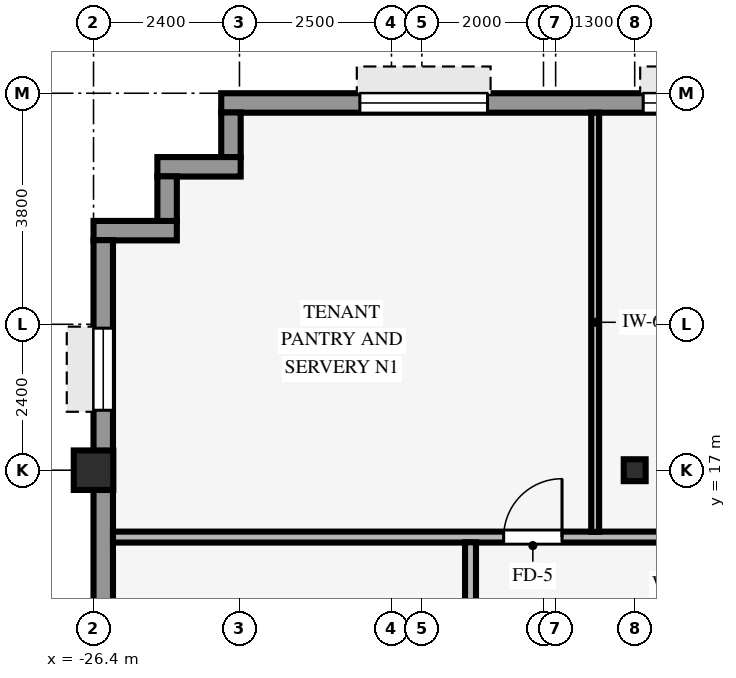
"""IFC4 building model, lengths in metres.
Left out: names, types, materials, properties, quantities, classifications, styles, units other than length and angle.
Written with IfcOpenShell. Run it as: python <this file> out.ifc"""

import sys

from ifc_helpers import new_model, si_unit, direction, frame, frame_2d, origin, origin_2d, place, context, subcontext, project, spatial, rectangle, hollow_rectangle, i_section, extrude, source, transform, mapped, element, fill, save


model = new_model("IFC4")
c1 = context("Model", 3, precision=1e-05, world=origin(), true_north=direction((0.0, 1.0)))
c2 = subcontext(c1, "Body", "Model", "MODEL_VIEW")
j1 = project(units=[si_unit("LENGTHUNIT", "METRE"), si_unit("PLANEANGLEUNIT", "RADIAN")], contexts=[c1])
p1 = place(None, origin())
s1 = spatial("IfcSite", under=j1, at=p1, CompositionType="ELEMENT")
p2 = place(p1, origin())
s2 = spatial("IfcBuilding", under=s1, at=p2, CompositionType="ELEMENT")
p3 = place(p2, frame((0.0, 0.0, 164.0)))
s3 = spatial("IfcBuildingStorey", under=s2, at=p3, CompositionType="ELEMENT", Elevation=164.0)
p4 = place(p3, frame((-26.4, 17.0, 0.0), z_axis=(0.0, 0.0, 1.0), x_axis=(1.0, 0.0, 0.0)))
e1 = element("IfcColumn", 1, at=p4, inside=s3, PredefinedType="COLUMN", context=c2, shape_type="SweptSolid", body=[
    extrude(hollow_rectangle(XDim=0.65, YDim=0.65, WallThickness=0.04, InnerFilletRadius=0.04, OuterFilletRadius=0.08, at=origin_2d()), origin(), (0.0, 0.0, 1.0), 3.25),
])
p5 = place(p3, frame((-17.5, 17.0, 0.0), z_axis=(0.0, 0.0, 1.0), x_axis=(1.0, 0.0, 0.0)))
e2 = element("IfcColumn", 2, at=p5, inside=s3, PredefinedType="COLUMN", context=c2, shape_type="SweptSolid", body=[
    extrude(i_section(OverallWidth=0.36, OverallDepth=0.36, WebThickness=0.021, FlangeThickness=0.021, FilletRadius=0.018, at=origin_2d()), origin(), (0.0, 0.0, 1.0), 3.25),
])
p6 = place(p3, frame((-24.3, 23.04, 0.0), z_axis=(0.0, 0.0, 1.0), x_axis=(1.0, 0.0, 0.0)))
e3 = element("IfcWall", 3, at=p6, inside=s3, PredefinedType="STANDARD", context=c2, shape_type="SweptSolid", body=[
    extrude(rectangle(XDim=48.6, YDim=0.32, at=frame_2d((24.3, 0.0))), origin(), (0.0, 0.0, 1.0), 2.792),
])
p7 = place(p6, frame((28.5, 0.0, 0.0)))
e4 = element("IfcOpeningElement", 4, at=p7, cuts=e3, PredefinedType="OPENING", context=c2, shape_type="SweptSolid", body=[
    extrude(rectangle(XDim=1.05, YDim=2.1, at=frame_2d((0.525, 1.05))), frame((0.0, 0.17, 0.0), z_axis=(0.0, -1.0, 0.0), x_axis=(1.0, 0.0, 0.0)), (0.0, 0.0, 1.0), 0.34),
])
p8 = place(p6, frame((2.28, 0.0, 0.8)))
e5 = element("IfcOpeningElement", 5, at=p8, cuts=e3, PredefinedType="OPENING", context=c2, shape_type="SweptSolid", body=[
    extrude(rectangle(XDim=2.1, YDim=1.56, at=frame_2d((1.05, 0.78))), frame((0.0, 0.17, 0.0), z_axis=(0.0, -1.0, 0.0), x_axis=(1.0, 0.0, 0.0)), (0.0, 0.0, 1.0), 0.34),
])
p9 = place(p6, frame((6.94, 0.0, 0.8)))
e6 = element("IfcOpeningElement", 6, at=p9, cuts=e3, PredefinedType="OPENING", context=c2, shape_type="SweptSolid", body=[
    extrude(rectangle(XDim=2.1, YDim=1.56, at=frame_2d((1.05, 0.78))), frame((0.0, 0.17, 0.0), z_axis=(0.0, -1.0, 0.0), x_axis=(1.0, 0.0, 0.0)), (0.0, 0.0, 1.0), 0.34),
])
p10 = place(p6, frame((11.6, 0.0, 0.8)))
e7 = element("IfcOpeningElement", 7, at=p10, cuts=e3, PredefinedType="OPENING", context=c2, shape_type="SweptSolid", body=[
    extrude(rectangle(XDim=2.1, YDim=1.56, at=frame_2d((1.05, 0.78))), frame((0.0, 0.17, 0.0), z_axis=(0.0, -1.0, 0.0), x_axis=(1.0, 0.0, 0.0)), (0.0, 0.0, 1.0), 0.34),
])
p11 = place(p6, frame((17.61, 0.0, 0.8)))
e8 = element("IfcOpeningElement", 8, at=p11, cuts=e3, PredefinedType="OPENING", context=c2, shape_type="SweptSolid", body=[
    extrude(rectangle(XDim=2.1, YDim=1.56, at=frame_2d((1.05, 0.78))), frame((0.0, 0.17, 0.0), z_axis=(0.0, -1.0, 0.0), x_axis=(1.0, 0.0, 0.0)), (0.0, 0.0, 1.0), 0.34),
])
p12 = place(p6, frame((20.92, 0.0, 0.8)))
e9 = element("IfcOpeningElement", 9, at=p12, cuts=e3, PredefinedType="OPENING", context=c2, shape_type="SweptSolid", body=[
    extrude(rectangle(XDim=2.1, YDim=1.56, at=frame_2d((1.05, 0.78))), frame((0.0, 0.17, 0.0), z_axis=(0.0, -1.0, 0.0), x_axis=(1.0, 0.0, 0.0)), (0.0, 0.0, 1.0), 0.34),
])
p13 = place(p6, frame((25.58, 0.0, 0.8)))
e10 = element("IfcOpeningElement", 10, at=p13, cuts=e3, PredefinedType="OPENING", context=c2, shape_type="SweptSolid", body=[
    extrude(rectangle(XDim=2.1, YDim=1.56, at=frame_2d((1.05, 0.78))), frame((0.0, 0.17, 0.0), z_axis=(0.0, -1.0, 0.0), x_axis=(1.0, 0.0, 0.0)), (0.0, 0.0, 1.0), 0.34),
])
p14 = place(p6, frame((34.9, 0.0, 0.8)))
e11 = element("IfcOpeningElement", 11, at=p14, cuts=e3, PredefinedType="OPENING", context=c2, shape_type="SweptSolid", body=[
    extrude(rectangle(XDim=2.1, YDim=1.56, at=frame_2d((1.05, 0.78))), frame((0.0, 0.17, 0.0), z_axis=(0.0, -1.0, 0.0), x_axis=(1.0, 0.0, 0.0)), (0.0, 0.0, 1.0), 0.34),
])
p15 = place(p6, frame((39.56, 0.0, 0.8)))
e12 = element("IfcOpeningElement", 12, at=p15, cuts=e3, PredefinedType="OPENING", context=c2, shape_type="SweptSolid", body=[
    extrude(rectangle(XDim=2.1, YDim=1.56, at=frame_2d((1.05, 0.78))), frame((0.0, 0.17, 0.0), z_axis=(0.0, -1.0, 0.0), x_axis=(1.0, 0.0, 0.0)), (0.0, 0.0, 1.0), 0.34),
])
p16 = place(p6, frame((44.22, 0.0, 0.8)))
e13 = element("IfcOpeningElement", 13, at=p16, cuts=e3, PredefinedType="OPENING", context=c2, shape_type="SweptSolid", body=[
    extrude(rectangle(XDim=2.1, YDim=1.56, at=frame_2d((1.05, 0.78))), frame((0.0, 0.17, 0.0), z_axis=(0.0, -1.0, 0.0), x_axis=(1.0, 0.0, 0.0)), (0.0, 0.0, 1.0), 0.34),
])
p17 = place(p3, frame((-24.14, 22.146, 0.0), z_axis=(0.0, 0.0, 1.0), x_axis=(0.0, 1.0, 0.0)))
e14 = element("IfcWall", 14, at=p17, inside=s3, PredefinedType="STANDARD", context=c2, shape_type="SweptSolid", body=[
    extrude(rectangle(XDim=0.738, YDim=0.32, at=frame_2d((0.369, 0.0))), origin(), (0.0, 0.0, 1.0), 3.24),
])
p18 = place(p3, frame((-25.35, 21.99, 0.0), z_axis=(0.0, 0.0, 1.0), x_axis=(1.0, 0.0, 0.0)))
e15 = element("IfcWall", 15, at=p18, inside=s3, PredefinedType="STANDARD", context=c2, shape_type="SweptSolid", body=[
    extrude(rectangle(XDim=1.37, YDim=0.32, at=frame_2d((0.685, 0.0))), origin(), (0.0, 0.0, 1.0), 3.24),
])
p19 = place(p3, frame((-25.19, 21.096, 0.0), z_axis=(0.0, 0.0, 1.0), x_axis=(0.0, 1.0, 0.0)))
e16 = element("IfcWall", 16, at=p19, inside=s3, PredefinedType="STANDARD", context=c2, shape_type="SweptSolid", body=[
    extrude(rectangle(XDim=0.738, YDim=0.32, at=frame_2d((0.369, 0.0))), origin(), (0.0, 0.0, 1.0), 3.24),
])
p20 = place(p3, frame((-26.4, 20.94, 0.0), z_axis=(0.0, 0.0, 1.0), x_axis=(1.0, 0.0, 0.0)))
e17 = element("IfcWall", 17, at=p20, inside=s3, PredefinedType="STANDARD", context=c2, shape_type="SweptSolid", body=[
    extrude(rectangle(XDim=1.37, YDim=0.32, at=frame_2d((0.685, 0.0))), origin(), (0.0, 0.0, 1.0), 3.24),
])
p21 = place(p3, frame((-26.24, -20.784, 0.0), z_axis=(0.0, 0.0, 1.0), x_axis=(0.0, 1.0, 0.0)))
e18 = element("IfcWall", 18, at=p21, inside=s3, PredefinedType="STANDARD", context=c2, shape_type="SweptSolid", body=[
    extrude(rectangle(XDim=41.568, YDim=0.32, at=frame_2d((20.784, 0.0))), origin(), (0.0, 0.0, 1.0), 2.585),
])
p22 = place(p21, frame((1.448, 0.0, 0.8)))
e19 = element("IfcOpeningElement", 19, at=p22, cuts=e18, PredefinedType="OPENING", context=c2, shape_type="SweptSolid", body=[
    extrude(rectangle(XDim=1.35, YDim=1.56, at=frame_2d((0.675, 0.78))), frame((0.0, 0.17, 0.0), z_axis=(0.0, -1.0, 0.0), x_axis=(1.0, 0.0, 0.0)), (0.0, 0.0, 1.0), 0.34),
])
p23 = place(p21, frame((7.744, 0.0, 0.8)))
e20 = element("IfcOpeningElement", 20, at=p23, cuts=e18, PredefinedType="OPENING", context=c2, shape_type="SweptSolid", body=[
    extrude(rectangle(XDim=1.35, YDim=1.56, at=frame_2d((0.675, 0.78))), frame((0.0, 0.17, 0.0), z_axis=(0.0, -1.0, 0.0), x_axis=(1.0, 0.0, 0.0)), (0.0, 0.0, 1.0), 0.34),
])
p24 = place(p21, frame((13.14, 0.0, 0.8)))
e21 = element("IfcOpeningElement", 21, at=p24, cuts=e18, PredefinedType="OPENING", context=c2, shape_type="SweptSolid", body=[
    extrude(rectangle(XDim=1.35, YDim=1.56, at=frame_2d((0.675, 0.78))), frame((0.0, 0.17, 0.0), z_axis=(0.0, -1.0, 0.0), x_axis=(1.0, 0.0, 0.0)), (0.0, 0.0, 1.0), 0.34),
])
p25 = place(p21, frame((17.636, 0.0, 0.8)))
e22 = element("IfcOpeningElement", 22, at=p25, cuts=e18, PredefinedType="OPENING", context=c2, shape_type="SweptSolid", body=[
    extrude(rectangle(XDim=1.35, YDim=1.56, at=frame_2d((0.675, 0.78))), frame((0.0, 0.17, 0.0), z_axis=(0.0, -1.0, 0.0), x_axis=(1.0, 0.0, 0.0)), (0.0, 0.0, 1.0), 0.34),
])
p26 = place(p21, frame((22.582, 0.0, 0.8)))
e23 = element("IfcOpeningElement", 23, at=p26, cuts=e18, PredefinedType="OPENING", context=c2, shape_type="SweptSolid", body=[
    extrude(rectangle(XDim=1.35, YDim=1.56, at=frame_2d((0.675, 0.78))), frame((0.0, 0.17, 0.0), z_axis=(0.0, -1.0, 0.0), x_axis=(1.0, 0.0, 0.0)), (0.0, 0.0, 1.0), 0.34),
])
p27 = place(p21, frame((27.078, 0.0, 0.8)))
e24 = element("IfcOpeningElement", 24, at=p27, cuts=e18, PredefinedType="OPENING", context=c2, shape_type="SweptSolid", body=[
    extrude(rectangle(XDim=1.35, YDim=1.56, at=frame_2d((0.675, 0.78))), frame((0.0, 0.17, 0.0), z_axis=(0.0, -1.0, 0.0), x_axis=(1.0, 0.0, 0.0)), (0.0, 0.0, 1.0), 0.34),
])
p28 = place(p21, frame((32.474, 0.0, 0.8)))
e25 = element("IfcOpeningElement", 25, at=p28, cuts=e18, PredefinedType="OPENING", context=c2, shape_type="SweptSolid", body=[
    extrude(rectangle(XDim=1.35, YDim=1.56, at=frame_2d((0.675, 0.78))), frame((0.0, 0.17, 0.0), z_axis=(0.0, -1.0, 0.0), x_axis=(1.0, 0.0, 0.0)), (0.0, 0.0, 1.0), 0.34),
])
p29 = place(p21, frame((38.77, 0.0, 0.8)))
e26 = element("IfcOpeningElement", 26, at=p29, cuts=e18, PredefinedType="OPENING", context=c2, shape_type="SweptSolid", body=[
    extrude(rectangle(XDim=1.35, YDim=1.56, at=frame_2d((0.675, 0.78))), frame((0.0, 0.17, 0.0), z_axis=(0.0, -1.0, 0.0), x_axis=(1.0, 0.0, 0.0)), (0.0, 0.0, 1.0), 0.34),
])
p30 = place(p3, frame((-26.08, 15.9, 0.0), z_axis=(0.0, 0.0, 1.0), x_axis=(1.0, 0.0, 0.0)))
e27 = element("IfcWall", 27, at=p30, inside=s3, PredefinedType="PARTITIONING", context=c2, shape_type="SweptSolid", body=[
    extrude(rectangle(XDim=52.16, YDim=0.18, at=frame_2d((26.08, 0.0))), origin(), (0.0, 0.0, 1.0), 3.24),
])
p31 = place(p30, frame((24.5, 0.0, 0.0)))
e28 = element("IfcOpeningElement", 28, at=p31, cuts=e27, PredefinedType="OPENING", context=c2, shape_type="SweptSolid", body=[
    extrude(rectangle(XDim=0.96, YDim=2.1, at=frame_2d((0.48, 1.05))), frame((0.0, 0.1, 0.0), z_axis=(0.0, -1.0, 0.0), x_axis=(1.0, 0.0, 0.0)), (0.0, 0.0, 1.0), 0.2),
])
p32 = place(p30, frame((40.5, 0.0, 0.0)))
e29 = element("IfcOpeningElement", 29, at=p32, cuts=e27, PredefinedType="OPENING", context=c2, shape_type="SweptSolid", body=[
    extrude(rectangle(XDim=0.96, YDim=2.1, at=frame_2d((0.48, 1.05))), frame((0.0, 0.1, 0.0), z_axis=(0.0, -1.0, 0.0), x_axis=(1.0, 0.0, 0.0)), (0.0, 0.0, 1.0), 0.2),
])
p33 = place(p30, frame((13.16, 0.0, 0.0)))
e30 = element("IfcOpeningElement", 30, at=p33, cuts=e27, PredefinedType="OPENING", context=c2, shape_type="SweptSolid", body=[
    extrude(rectangle(XDim=0.96, YDim=2.1, at=frame_2d((0.48, 1.05))), frame((0.0, 0.1, 0.0), z_axis=(0.0, -1.0, 0.0), x_axis=(1.0, 0.0, 0.0)), (0.0, 0.0, 1.0), 0.2),
])
p34 = place(p30, frame((6.425, 0.0, 0.0)))
e31 = element("IfcOpeningElement", 31, at=p34, cuts=e27, PredefinedType="OPENING", context=c2, shape_type="SweptSolid", body=[
    extrude(rectangle(XDim=0.96, YDim=2.1, at=frame_2d((0.48, 1.05))), frame((0.0, 0.1, 0.0), z_axis=(0.0, -1.0, 0.0), x_axis=(1.0, 0.0, 0.0)), (0.0, 0.0, 1.0), 0.2),
])
p35 = place(p3, frame((-20.2, -15.814, 0.0), z_axis=(0.0, 0.0, 1.0), x_axis=(0.0, 1.0, 0.0)))
e32 = element("IfcWall", 32, at=p35, inside=s3, PredefinedType="PARTITIONING", context=c2, shape_type="SweptSolid", body=[
    extrude(rectangle(XDim=31.628, YDim=0.18, at=frame_2d((15.814, 0.0))), origin(), (0.0, 0.0, 1.0), 3.24),
])
p36 = place(p35, frame((11.434, 0.0, 0.0)))
e33 = element("IfcOpeningElement", 33, at=p36, cuts=e32, PredefinedType="OPENING", context=c2, shape_type="SweptSolid", body=[
    extrude(rectangle(XDim=0.96, YDim=2.1, at=frame_2d((0.48, 1.05))), frame((0.0, 0.1, 0.0), z_axis=(0.0, -1.0, 0.0), x_axis=(1.0, 0.0, 0.0)), (0.0, 0.0, 1.0), 0.2),
])
p37 = place(p35, frame((19.634, 0.0, 0.0)))
e34 = element("IfcOpeningElement", 34, at=p37, cuts=e32, PredefinedType="OPENING", context=c2, shape_type="SweptSolid", body=[
    extrude(rectangle(XDim=0.96, YDim=2.1, at=frame_2d((0.48, 1.05))), frame((0.0, 0.1, 0.0), z_axis=(0.0, -1.0, 0.0), x_axis=(1.0, 0.0, 0.0)), (0.0, 0.0, 1.0), 0.2),
])
p38 = place(p35, frame((4.484, 0.0, 0.0)))
e35 = element("IfcOpeningElement", 35, at=p38, cuts=e32, PredefinedType="OPENING", context=c2, shape_type="SweptSolid", body=[
    extrude(rectangle(XDim=0.96, YDim=2.1, at=frame_2d((0.48, 1.05))), frame((0.0, 0.1, 0.0), z_axis=(0.0, -1.0, 0.0), x_axis=(1.0, 0.0, 0.0)), (0.0, 0.0, 1.0), 0.2),
])
p39 = place(p35, frame((26.184, 0.0, 0.0)))
e36 = element("IfcOpeningElement", 36, at=p39, cuts=e32, PredefinedType="OPENING", context=c2, shape_type="SweptSolid", body=[
    extrude(rectangle(XDim=0.96, YDim=2.1, at=frame_2d((0.48, 1.05))), frame((0.0, 0.1, 0.0), z_axis=(0.0, -1.0, 0.0), x_axis=(1.0, 0.0, 0.0)), (0.0, 0.0, 1.0), 0.2),
])
p40 = place(p3, frame((-18.15, 15.986, 0.0), z_axis=(0.0, 0.0, 1.0), x_axis=(0.0, 1.0, 0.0)))
e37 = element("IfcWall", 37, at=p40, inside=s3, PredefinedType="PARTITIONING", context=c2, shape_type="SweptSolid", body=[
    extrude(rectangle(XDim=6.894, YDim=0.13, at=frame_2d((3.447, 0.0))), origin(), (0.0, 0.0, 1.0), 3.24),
])
m1 = source(origin(), c2, "Body", "SweptSolid", [
    extrude(rectangle(XDim=2.1, YDim=1.56, at=frame_2d((1.05, 0.78))), frame((0.0, 0.03, 0.0), z_axis=(0.0, -1.0, 0.0), x_axis=(1.0, 0.0, 0.0)), (0.0, 0.0, 1.0), 0.06),
])
p41 = place(p8, origin())
e38 = element("IfcWindow", 38, at=p41, inside=s3, PartitioningType="SINGLE_PANEL", PredefinedType="WINDOW", context=c2, shape_type="MappedRepresentation", body=[
    mapped(m1, transform((0.0, 0.0, 0.0), scale=1.0)),
])
fill(e5, e38)
p42 = place(p9, origin())
e39 = element("IfcWindow", 39, at=p42, inside=s3, PartitioningType="SINGLE_PANEL", PredefinedType="WINDOW", context=c2, shape_type="MappedRepresentation", body=[
    mapped(m1, transform((0.0, 0.0, 0.0), scale=1.0)),
])
fill(e6, e39)
m2 = source(origin(), c2, "Body", "SweptSolid", [
    extrude(rectangle(XDim=1.35, YDim=1.56, at=frame_2d((0.675, 0.78))), frame((0.0, 0.03, 0.0), z_axis=(0.0, -1.0, 0.0), x_axis=(1.0, 0.0, 0.0)), (0.0, 0.0, 1.0), 0.06),
])
p43 = place(p29, origin())
e40 = element("IfcWindow", 40, at=p43, inside=s3, PartitioningType="SINGLE_PANEL", PredefinedType="WINDOW", context=c2, shape_type="MappedRepresentation", body=[
    mapped(m2, transform((0.0, 0.0, 0.0), scale=1.0)),
])
fill(e26, e40)
m3 = source(origin(), c2, "Body", "SweptSolid", [
    extrude(rectangle(XDim=0.96, YDim=2.1, at=frame_2d((0.48, 1.05))), frame((0.0, 0.025, 0.0), z_axis=(0.0, -1.0, 0.0), x_axis=(1.0, 0.0, 0.0)), (0.0, 0.0, 1.0), 0.05),
])
p44 = place(p34, origin())
e41 = element("IfcDoor", 41, at=p44, inside=s3, OperationType="SINGLE_SWING_RIGHT", PredefinedType="DOOR", context=c2, shape_type="MappedRepresentation", body=[
    mapped(m3, transform((0.0, 0.0, 0.0), scale=1.0)),
])
fill(e31, e41)
save(model, sys.argv[1])
